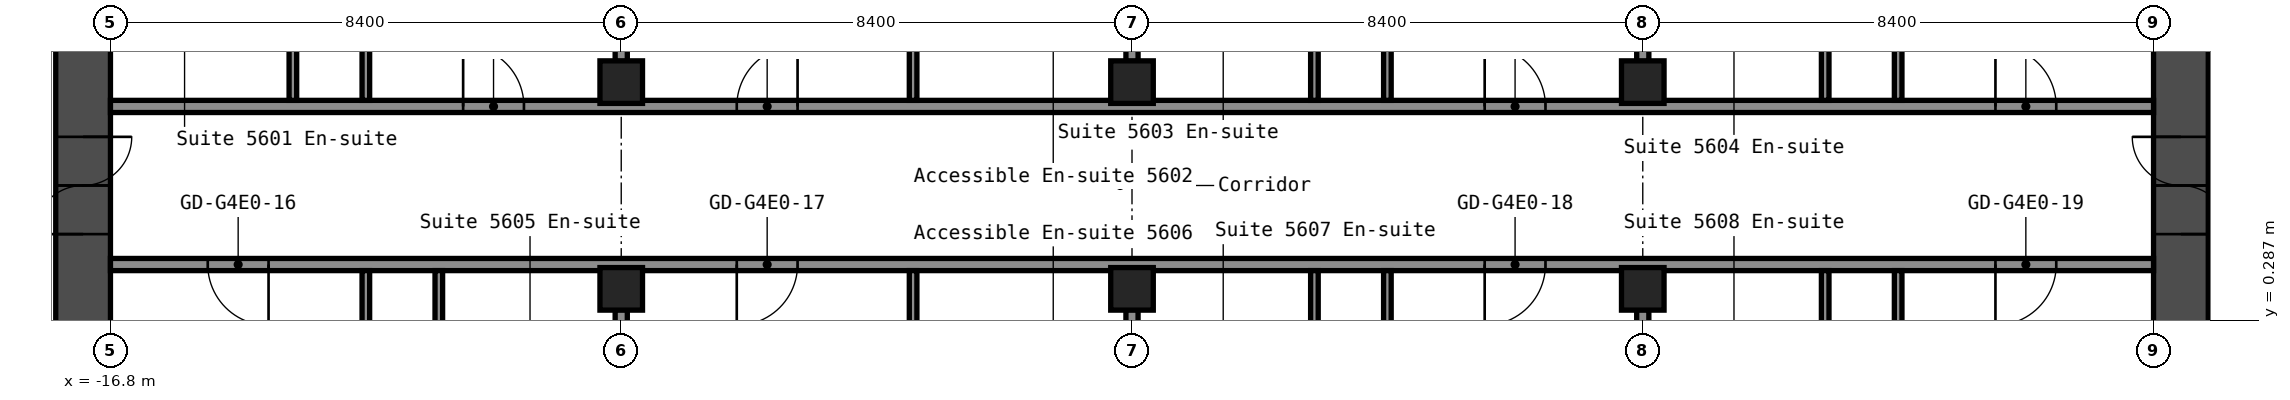
"""IFC4 building model, lengths in metres.
Left out: names, types, materials, properties, quantities, classifications, styles, units other than length and angle.
Written with IfcOpenShell. Run it as: python <this file> out.ifc"""

import sys

from ifc_helpers import new_model, si_unit, direction, frame, frame_2d, origin, origin_2d, place, context, subcontext, project, spatial, rectangle, hollow_rectangle, extrude, element, fill, save


model = new_model("IFC4")
c1 = context("Model", 3, precision=1e-05, world=origin(), true_north=direction((0.0, 1.0)))
c2 = subcontext(c1, "Body", "Model", "MODEL_VIEW")
j1 = project(units=[si_unit("LENGTHUNIT", "METRE"), si_unit("PLANEANGLEUNIT", "RADIAN")], contexts=[c1])
p1 = place(None, origin())
s1 = spatial("IfcSite", under=j1, at=p1, CompositionType="ELEMENT")
p2 = place(p1, origin())
s2 = spatial("IfcBuilding", under=s1, at=p2, CompositionType="ELEMENT")
p3 = place(p2, frame((0.0, 0.0, 199.4)))
s3 = spatial("IfcBuildingStorey", under=s2, at=p3, CompositionType="ELEMENT", Elevation=199.4)
for number, where, z_axis, x_axis in (
    (1, (-8.4, 0.8, 0.0), (0.0, 0.0, 1.0), (1.0, 0.0, 0.0)),
    (2, (-8.4, 4.2, 0.0), (0.0, 0.0, 1.0), (1.0, 0.0, 0.0)),
    (3, (0.0, 0.8, 0.0), (0.0, 0.0, 1.0), (1.0, 0.0, 0.0)),
    (4, (0.0, 4.2, 0.0), (0.0, 0.0, 1.0), (1.0, 0.0, 0.0)),
    (5, (8.4, 0.8, 0.0), (0.0, 0.0, 1.0), (1.0, 0.0, 0.0)),
    (6, (8.4, 4.2, 0.0), (0.0, 0.0, 1.0), (1.0, 0.0, 0.0)),
):
    element("IfcColumn", number, at=place(p3, frame(where, z_axis=z_axis, x_axis=x_axis)), inside=s3, PredefinedType="COLUMN", context=c2, shape_type="SweptSolid", body=[
        extrude(hollow_rectangle(XDim=0.7, YDim=0.7, WallThickness=0.028, at=origin_2d()), origin(), (0.0, 0.0, 1.0), 2.75),
    ])
p4 = place(p3, frame((-17.25, -8.4, 0.0), z_axis=(0.0, 0.0, 1.0), x_axis=(0.0, 1.0, 0.0)))
e7 = element("IfcWall", 7, at=p4, inside=s3, PredefinedType="SHEAR", context=c2, shape_type="SweptSolid", body=[
    extrude(rectangle(XDim=16.8, YDim=0.9, at=frame_2d((8.4, 0.0))), origin(), (0.0, 0.0, 1.0), 2.75),
])
p5 = place(p4, frame((10.1, 0.0, 0.0)))
e8 = element("IfcOpeningElement", 8, at=p5, cuts=e7, PredefinedType="OPENING", context=c2, shape_type="SweptSolid", body=[
    extrude(rectangle(XDim=1.6, YDim=2.1, at=frame_2d((0.8, 1.05))), frame((0.0, 0.46, 0.0), z_axis=(0.0, -1.0, 0.0), x_axis=(1.0, 0.0, 0.0)), (0.0, 0.0, 1.0), 0.92),
])
p6 = place(p3, frame((17.25, -8.4, 0.0), z_axis=(0.0, 0.0, 1.0), x_axis=(0.0, 1.0, 0.0)))
e9 = element("IfcWall", 9, at=p6, inside=s3, PredefinedType="SHEAR", context=c2, shape_type="SweptSolid", body=[
    extrude(rectangle(XDim=16.8, YDim=0.9, at=frame_2d((8.4, 0.0))), origin(), (0.0, 0.0, 1.0), 2.75),
])
p7 = place(p6, frame((10.1, 0.0, 0.0)))
e10 = element("IfcOpeningElement", 10, at=p7, cuts=e9, PredefinedType="OPENING", context=c2, shape_type="SweptSolid", body=[
    extrude(rectangle(XDim=1.6, YDim=2.1, at=frame_2d((0.8, 1.05))), frame((0.0, 0.46, 0.0), z_axis=(0.0, -1.0, 0.0), x_axis=(1.0, 0.0, 0.0)), (0.0, 0.0, 1.0), 0.92),
])
p8 = place(p3, frame((-16.8, 1.2, 0.0), z_axis=(0.0, 0.0, 1.0), x_axis=(1.0, 0.0, 0.0)))
e11 = element("IfcWall", 11, at=p8, inside=s3, PredefinedType="PARTITIONING", context=c2, shape_type="SweptSolid", body=[
    extrude(rectangle(XDim=33.6, YDim=0.2, at=frame_2d((16.8, 0.0))), origin(), (0.0, 0.0, 1.0), 2.75),
])
p9 = place(p8, frame((1.6, 0.0, 0.0)))
e12 = element("IfcOpeningElement", 12, at=p9, cuts=e11, PredefinedType="OPENING", context=c2, shape_type="SweptSolid", body=[
    extrude(rectangle(XDim=1.0, YDim=2.1, at=frame_2d((0.5, 1.05))), frame((0.0, 0.11, 0.0), z_axis=(0.0, -1.0, 0.0), x_axis=(1.0, 0.0, 0.0)), (0.0, 0.0, 1.0), 0.22),
])
p10 = place(p8, frame((10.3, 0.0, 0.0)))
e13 = element("IfcOpeningElement", 13, at=p10, cuts=e11, PredefinedType="OPENING", context=c2, shape_type="SweptSolid", body=[
    extrude(rectangle(XDim=1.0, YDim=2.1, at=frame_2d((0.5, 1.05))), frame((0.0, 0.11, 0.0), z_axis=(0.0, -1.0, 0.0), x_axis=(1.0, 0.0, 0.0)), (0.0, 0.0, 1.0), 0.22),
])
p11 = place(p8, frame((22.6, 0.0, 0.0)))
e14 = element("IfcOpeningElement", 14, at=p11, cuts=e11, PredefinedType="OPENING", context=c2, shape_type="SweptSolid", body=[
    extrude(rectangle(XDim=1.0, YDim=2.1, at=frame_2d((0.5, 1.05))), frame((0.0, 0.11, 0.0), z_axis=(0.0, -1.0, 0.0), x_axis=(1.0, 0.0, 0.0)), (0.0, 0.0, 1.0), 0.22),
])
p12 = place(p8, frame((31.0, 0.0, 0.0)))
e15 = element("IfcOpeningElement", 15, at=p12, cuts=e11, PredefinedType="OPENING", context=c2, shape_type="SweptSolid", body=[
    extrude(rectangle(XDim=1.0, YDim=2.1, at=frame_2d((0.5, 1.05))), frame((0.0, 0.11, 0.0), z_axis=(0.0, -1.0, 0.0), x_axis=(1.0, 0.0, 0.0)), (0.0, 0.0, 1.0), 0.22),
])
p13 = place(p3, frame((-16.8, 3.8, 0.0), z_axis=(0.0, 0.0, 1.0), x_axis=(1.0, 0.0, 0.0)))
e16 = element("IfcWall", 16, at=p13, inside=s3, PredefinedType="PARTITIONING", context=c2, shape_type="SweptSolid", body=[
    extrude(rectangle(XDim=33.6, YDim=0.2, at=frame_2d((16.8, 0.0))), origin(), (0.0, 0.0, 1.0), 2.75),
])
p14 = place(p13, frame((5.8, 0.0, 0.0)))
e17 = element("IfcOpeningElement", 17, at=p14, cuts=e16, PredefinedType="OPENING", context=c2, shape_type="SweptSolid", body=[
    extrude(rectangle(XDim=1.0, YDim=2.1, at=frame_2d((0.5, 1.05))), frame((0.0, 0.11, 0.0), z_axis=(0.0, -1.0, 0.0), x_axis=(1.0, 0.0, 0.0)), (0.0, 0.0, 1.0), 0.22),
])
p15 = place(p13, frame((10.3, 0.0, 0.0)))
e18 = element("IfcOpeningElement", 18, at=p15, cuts=e16, PredefinedType="OPENING", context=c2, shape_type="SweptSolid", body=[
    extrude(rectangle(XDim=1.0, YDim=2.1, at=frame_2d((0.5, 1.05))), frame((0.0, 0.11, 0.0), z_axis=(0.0, -1.0, 0.0), x_axis=(1.0, 0.0, 0.0)), (0.0, 0.0, 1.0), 0.22),
])
p16 = place(p13, frame((22.6, 0.0, 0.0)))
e19 = element("IfcOpeningElement", 19, at=p16, cuts=e16, PredefinedType="OPENING", context=c2, shape_type="SweptSolid", body=[
    extrude(rectangle(XDim=1.0, YDim=2.1, at=frame_2d((0.5, 1.05))), frame((0.0, 0.11, 0.0), z_axis=(0.0, -1.0, 0.0), x_axis=(1.0, 0.0, 0.0)), (0.0, 0.0, 1.0), 0.22),
])
p17 = place(p13, frame((31.0, 0.0, 0.0)))
e20 = element("IfcOpeningElement", 20, at=p17, cuts=e16, PredefinedType="OPENING", context=c2, shape_type="SweptSolid", body=[
    extrude(rectangle(XDim=1.0, YDim=2.1, at=frame_2d((0.5, 1.05))), frame((0.0, 0.11, 0.0), z_axis=(0.0, -1.0, 0.0), x_axis=(1.0, 0.0, 0.0)), (0.0, 0.0, 1.0), 0.22),
])
p18 = place(p3, frame((-13.8, 3.9, 0.0), z_axis=(0.0, 0.0, 1.0), x_axis=(0.0, 1.0, 0.0)))
e21 = element("IfcWall", 21, at=p18, inside=s3, PredefinedType="PARTITIONING", context=c2, shape_type="SweptSolid", body=[
    extrude(rectangle(XDim=3.1, YDim=0.125, at=frame_2d((1.55, 0.0))), origin(), (0.0, 0.0, 1.0), 2.75),
])
p19 = place(p3, frame((-12.6, -15.55, 0.0), z_axis=(0.0, 0.0, 1.0), x_axis=(0.0, 1.0, 0.0)))
e22 = element("IfcWall", 22, at=p19, inside=s3, PredefinedType="PARTITIONING", context=c2, shape_type="SweptSolid", body=[
    extrude(rectangle(XDim=16.65, YDim=0.125, at=frame_2d((8.325, 0.0))), origin(), (0.0, 0.0, 1.0), 2.75),
])
p20 = place(p19, frame((11.7, 0.0, 0.0)))
e23 = element("IfcOpeningElement", 23, at=p20, cuts=e22, PredefinedType="OPENING", context=c2, shape_type="SweptSolid", body=[
    extrude(rectangle(XDim=0.9, YDim=2.1, at=frame_2d((0.45, 1.05))), frame((0.0, 0.073, 0.0), z_axis=(0.0, -1.0, 0.0), x_axis=(1.0, 0.0, 0.0)), (0.0, 0.0, 1.0), 0.145),
])
p21 = place(p3, frame((-12.6, 3.9, 0.0), z_axis=(0.0, 0.0, 1.0), x_axis=(0.0, 1.0, 0.0)))
e24 = element("IfcWall", 24, at=p21, inside=s3, PredefinedType="PARTITIONING", context=c2, shape_type="SweptSolid", body=[
    extrude(rectangle(XDim=16.65, YDim=0.125, at=frame_2d((8.325, 0.0))), origin(), (0.0, 0.0, 1.0), 2.75),
])
p22 = place(p21, frame((4.05, 0.0, 0.0)))
e25 = element("IfcOpeningElement", 25, at=p22, cuts=e24, PredefinedType="OPENING", context=c2, shape_type="SweptSolid", body=[
    extrude(rectangle(XDim=0.9, YDim=2.1, at=frame_2d((0.45, 1.05))), frame((0.0, 0.073, 0.0), z_axis=(0.0, -1.0, 0.0), x_axis=(1.0, 0.0, 0.0)), (0.0, 0.0, 1.0), 0.145),
])
p23 = place(p3, frame((-11.4, -2.0, 0.0), z_axis=(0.0, 0.0, 1.0), x_axis=(0.0, 1.0, 0.0)))
e26 = element("IfcWall", 26, at=p23, inside=s3, PredefinedType="PARTITIONING", context=c2, shape_type="SweptSolid", body=[
    extrude(rectangle(XDim=3.1, YDim=0.125, at=frame_2d((1.55, 0.0))), origin(), (0.0, 0.0, 1.0), 2.75),
])
for number, where, z_axis, x_axis in (
    (27, (-8.4, -15.55, 0.0), (0.0, 0.0, 1.0), (0.0, 1.0, 0.0)),
    (28, (-8.4, 4.54, 0.0), (0.0, 0.0, 1.0), (0.0, 1.0, 0.0)),
):
    element("IfcWall", number, at=place(p3, frame(where, z_axis=z_axis, x_axis=x_axis)), inside=s3, PredefinedType="PARTITIONING", context=c2, shape_type="SweptSolid", body=[
        extrude(rectangle(XDim=16.01, YDim=0.2, at=frame_2d((8.005, 0.0))), origin(), (0.0, 0.0, 1.0), 2.75),
    ])
p24 = place(p3, frame((-3.6, -2.2, 0.0), z_axis=(0.0, 0.0, 1.0), x_axis=(0.0, 1.0, 0.0)))
e29 = element("IfcWall", 29, at=p24, inside=s3, PredefinedType="PARTITIONING", context=c2, shape_type="SweptSolid", body=[
    extrude(rectangle(XDim=3.3, YDim=0.125, at=frame_2d((1.65, 0.0))), origin(), (0.0, 0.0, 1.0), 2.75),
])
p25 = place(p24, frame((1.2, 0.0, 0.0)))
e30 = element("IfcOpeningElement", 30, at=p25, cuts=e29, PredefinedType="OPENING", context=c2, shape_type="SweptSolid", body=[
    extrude(rectangle(XDim=1.0, YDim=2.1, at=frame_2d((0.5, 1.05))), frame((0.0, 0.073, 0.0), z_axis=(0.0, -1.0, 0.0), x_axis=(1.0, 0.0, 0.0)), (0.0, 0.0, 1.0), 0.145),
])
p26 = place(p3, frame((-3.6, 3.9, 0.0), z_axis=(0.0, 0.0, 1.0), x_axis=(0.0, 1.0, 0.0)))
e31 = element("IfcWall", 31, at=p26, inside=s3, PredefinedType="PARTITIONING", context=c2, shape_type="SweptSolid", body=[
    extrude(rectangle(XDim=3.3, YDim=0.125, at=frame_2d((1.65, 0.0))), origin(), (0.0, 0.0, 1.0), 2.75),
])
p27 = place(p26, frame((1.1, 0.0, 0.0)))
e32 = element("IfcOpeningElement", 32, at=p27, cuts=e31, PredefinedType="OPENING", context=c2, shape_type="SweptSolid", body=[
    extrude(rectangle(XDim=1.0, YDim=2.1, at=frame_2d((0.5, 1.05))), frame((0.0, 0.073, 0.0), z_axis=(0.0, -1.0, 0.0), x_axis=(1.0, 0.0, 0.0)), (0.0, 0.0, 1.0), 0.145),
])
for number, where, z_axis, x_axis in (
    (33, (0.0, -15.55, 0.0), (0.0, 0.0, 1.0), (0.0, 1.0, 0.0)),
    (34, (0.0, 4.54, 0.0), (0.0, 0.0, 1.0), (0.0, 1.0, 0.0)),
):
    element("IfcWall", number, at=place(p3, frame(where, z_axis=z_axis, x_axis=x_axis)), inside=s3, PredefinedType="PARTITIONING", context=c2, shape_type="SweptSolid", body=[
        extrude(rectangle(XDim=16.01, YDim=0.2, at=frame_2d((8.005, 0.0))), origin(), (0.0, 0.0, 1.0), 2.75),
    ])
for number, where, z_axis, x_axis in (
    (35, (3.0, -2.0, 0.0), (0.0, 0.0, 1.0), (0.0, 1.0, 0.0)),
    (36, (3.0, 3.9, 0.0), (0.0, 0.0, 1.0), (0.0, 1.0, 0.0)),
):
    element("IfcWall", number, at=place(p3, frame(where, z_axis=z_axis, x_axis=x_axis)), inside=s3, PredefinedType="PARTITIONING", context=c2, shape_type="SweptSolid", body=[
        extrude(rectangle(XDim=3.1, YDim=0.125, at=frame_2d((1.55, 0.0))), origin(), (0.0, 0.0, 1.0), 2.75),
    ])
p28 = place(p3, frame((4.2, -15.55, 0.0), z_axis=(0.0, 0.0, 1.0), x_axis=(0.0, 1.0, 0.0)))
e37 = element("IfcWall", 37, at=p28, inside=s3, PredefinedType="PARTITIONING", context=c2, shape_type="SweptSolid", body=[
    extrude(rectangle(XDim=16.65, YDim=0.125, at=frame_2d((8.325, 0.0))), origin(), (0.0, 0.0, 1.0), 2.75),
])
p29 = place(p28, frame((11.7, 0.0, 0.0)))
e38 = element("IfcOpeningElement", 38, at=p29, cuts=e37, PredefinedType="OPENING", context=c2, shape_type="SweptSolid", body=[
    extrude(rectangle(XDim=0.9, YDim=2.1, at=frame_2d((0.45, 1.05))), frame((0.0, 0.073, 0.0), z_axis=(0.0, -1.0, 0.0), x_axis=(1.0, 0.0, 0.0)), (0.0, 0.0, 1.0), 0.145),
])
p30 = place(p3, frame((4.2, 3.9, 0.0), z_axis=(0.0, 0.0, 1.0), x_axis=(0.0, 1.0, 0.0)))
e39 = element("IfcWall", 39, at=p30, inside=s3, PredefinedType="PARTITIONING", context=c2, shape_type="SweptSolid", body=[
    extrude(rectangle(XDim=16.65, YDim=0.125, at=frame_2d((8.325, 0.0))), origin(), (0.0, 0.0, 1.0), 2.75),
])
p31 = place(p30, frame((4.05, 0.0, 0.0)))
e40 = element("IfcOpeningElement", 40, at=p31, cuts=e39, PredefinedType="OPENING", context=c2, shape_type="SweptSolid", body=[
    extrude(rectangle(XDim=0.9, YDim=2.1, at=frame_2d((0.45, 1.05))), frame((0.0, 0.073, 0.0), z_axis=(0.0, -1.0, 0.0), x_axis=(1.0, 0.0, 0.0)), (0.0, 0.0, 1.0), 0.145),
])
for number, where, z_axis, x_axis in (
    (41, (8.4, -15.55, 0.0), (0.0, 0.0, 1.0), (0.0, 1.0, 0.0)),
    (42, (8.4, 4.54, 0.0), (0.0, 0.0, 1.0), (0.0, 1.0, 0.0)),
):
    element("IfcWall", number, at=place(p3, frame(where, z_axis=z_axis, x_axis=x_axis)), inside=s3, PredefinedType="PARTITIONING", context=c2, shape_type="SweptSolid", body=[
        extrude(rectangle(XDim=16.01, YDim=0.2, at=frame_2d((8.005, 0.0))), origin(), (0.0, 0.0, 1.0), 2.75),
    ])
for number, where, z_axis, x_axis in (
    (43, (11.4, -2.0, 0.0), (0.0, 0.0, 1.0), (0.0, 1.0, 0.0)),
    (44, (11.4, 3.9, 0.0), (0.0, 0.0, 1.0), (0.0, 1.0, 0.0)),
):
    element("IfcWall", number, at=place(p3, frame(where, z_axis=z_axis, x_axis=x_axis)), inside=s3, PredefinedType="PARTITIONING", context=c2, shape_type="SweptSolid", body=[
        extrude(rectangle(XDim=3.1, YDim=0.125, at=frame_2d((1.55, 0.0))), origin(), (0.0, 0.0, 1.0), 2.75),
    ])
p32 = place(p3, frame((12.6, -15.55, 0.0), z_axis=(0.0, 0.0, 1.0), x_axis=(0.0, 1.0, 0.0)))
e45 = element("IfcWall", 45, at=p32, inside=s3, PredefinedType="PARTITIONING", context=c2, shape_type="SweptSolid", body=[
    extrude(rectangle(XDim=16.65, YDim=0.125, at=frame_2d((8.325, 0.0))), origin(), (0.0, 0.0, 1.0), 2.75),
])
p33 = place(p32, frame((11.7, 0.0, 0.0)))
e46 = element("IfcOpeningElement", 46, at=p33, cuts=e45, PredefinedType="OPENING", context=c2, shape_type="SweptSolid", body=[
    extrude(rectangle(XDim=0.9, YDim=2.1, at=frame_2d((0.45, 1.05))), frame((0.0, 0.073, 0.0), z_axis=(0.0, -1.0, 0.0), x_axis=(1.0, 0.0, 0.0)), (0.0, 0.0, 1.0), 0.145),
])
p34 = place(p3, frame((12.6, 3.9, 0.0), z_axis=(0.0, 0.0, 1.0), x_axis=(0.0, 1.0, 0.0)))
e47 = element("IfcWall", 47, at=p34, inside=s3, PredefinedType="PARTITIONING", context=c2, shape_type="SweptSolid", body=[
    extrude(rectangle(XDim=16.65, YDim=0.125, at=frame_2d((8.325, 0.0))), origin(), (0.0, 0.0, 1.0), 2.75),
])
p35 = place(p34, frame((4.05, 0.0, 0.0)))
e48 = element("IfcOpeningElement", 48, at=p35, cuts=e47, PredefinedType="OPENING", context=c2, shape_type="SweptSolid", body=[
    extrude(rectangle(XDim=0.9, YDim=2.1, at=frame_2d((0.45, 1.05))), frame((0.0, 0.073, 0.0), z_axis=(0.0, -1.0, 0.0), x_axis=(1.0, 0.0, 0.0)), (0.0, 0.0, 1.0), 0.145),
])
p36 = place(p5, origin())
e49 = element("IfcDoor", 49, at=p36, inside=s3, OperationType="DOUBLE_DOOR_SINGLE_SWING", PredefinedType="DOOR", context=c2, shape_type="SweptSolid", body=[
    extrude(rectangle(XDim=1.6, YDim=2.1, at=frame_2d((0.8, 1.05))), frame((0.0, 0.025, 0.0), z_axis=(0.0, -1.0, 0.0), x_axis=(1.0, 0.0, 0.0)), (0.0, 0.0, 1.0), 0.05),
])
fill(e8, e49)
p37 = place(p7, origin())
e50 = element("IfcDoor", 50, at=p37, inside=s3, OperationType="DOUBLE_DOOR_SINGLE_SWING", PredefinedType="DOOR", context=c2, shape_type="SweptSolid", body=[
    extrude(rectangle(XDim=1.6, YDim=2.1, at=frame_2d((0.8, 1.05))), frame((0.0, 0.025, 0.0), z_axis=(0.0, -1.0, 0.0), x_axis=(1.0, 0.0, 0.0)), (0.0, 0.0, 1.0), 0.05),
])
fill(e10, e50)
p38 = place(p9, origin())
e51 = element("IfcDoor", 51, at=p38, inside=s3, OperationType="SINGLE_SWING_RIGHT", PredefinedType="DOOR", context=c2, shape_type="SweptSolid", body=[
    extrude(rectangle(XDim=1.0, YDim=2.1, at=frame_2d((0.5, 1.05))), frame((0.0, 0.025, 0.0), z_axis=(0.0, -1.0, 0.0), x_axis=(1.0, 0.0, 0.0)), (0.0, 0.0, 1.0), 0.05),
])
fill(e12, e51)
p39 = place(p10, origin())
e52 = element("IfcDoor", 52, at=p39, inside=s3, OperationType="SINGLE_SWING_LEFT", PredefinedType="DOOR", context=c2, shape_type="SweptSolid", body=[
    extrude(rectangle(XDim=1.0, YDim=2.1, at=frame_2d((0.5, 1.05))), frame((0.0, 0.025, 0.0), z_axis=(0.0, -1.0, 0.0), x_axis=(1.0, 0.0, 0.0)), (0.0, 0.0, 1.0), 0.05),
])
fill(e13, e52)
p40 = place(p11, origin())
e53 = element("IfcDoor", 53, at=p40, inside=s3, OperationType="SINGLE_SWING_LEFT", PredefinedType="DOOR", context=c2, shape_type="SweptSolid", body=[
    extrude(rectangle(XDim=1.0, YDim=2.1, at=frame_2d((0.5, 1.05))), frame((0.0, 0.025, 0.0), z_axis=(0.0, -1.0, 0.0), x_axis=(1.0, 0.0, 0.0)), (0.0, 0.0, 1.0), 0.05),
])
fill(e14, e53)
p41 = place(p12, origin())
e54 = element("IfcDoor", 54, at=p41, inside=s3, OperationType="SINGLE_SWING_LEFT", PredefinedType="DOOR", context=c2, shape_type="SweptSolid", body=[
    extrude(rectangle(XDim=1.0, YDim=2.1, at=frame_2d((0.5, 1.05))), frame((0.0, 0.025, 0.0), z_axis=(0.0, -1.0, 0.0), x_axis=(1.0, 0.0, 0.0)), (0.0, 0.0, 1.0), 0.05),
])
fill(e15, e54)
p42 = place(p14, origin())
e55 = element("IfcDoor", 55, at=p42, inside=s3, OperationType="SINGLE_SWING_RIGHT", PredefinedType="DOOR", context=c2, shape_type="SweptSolid", body=[
    extrude(rectangle(XDim=1.0, YDim=2.1, at=frame_2d((0.5, 1.05))), frame((0.0, 0.025, 0.0), z_axis=(0.0, -1.0, 0.0), x_axis=(1.0, 0.0, 0.0)), (0.0, 0.0, 1.0), 0.05),
])
fill(e17, e55)
p43 = place(p15, origin())
e56 = element("IfcDoor", 56, at=p43, inside=s3, OperationType="SINGLE_SWING_LEFT", PredefinedType="DOOR", context=c2, shape_type="SweptSolid", body=[
    extrude(rectangle(XDim=1.0, YDim=2.1, at=frame_2d((0.5, 1.05))), frame((0.0, 0.025, 0.0), z_axis=(0.0, -1.0, 0.0), x_axis=(1.0, 0.0, 0.0)), (0.0, 0.0, 1.0), 0.05),
])
fill(e18, e56)
p44 = place(p16, origin())
e57 = element("IfcDoor", 57, at=p44, inside=s3, OperationType="SINGLE_SWING_RIGHT", PredefinedType="DOOR", context=c2, shape_type="SweptSolid", body=[
    extrude(rectangle(XDim=1.0, YDim=2.1, at=frame_2d((0.5, 1.05))), frame((0.0, 0.025, 0.0), z_axis=(0.0, -1.0, 0.0), x_axis=(1.0, 0.0, 0.0)), (0.0, 0.0, 1.0), 0.05),
])
fill(e19, e57)
p45 = place(p17, origin())
e58 = element("IfcDoor", 58, at=p45, inside=s3, OperationType="SINGLE_SWING_RIGHT", PredefinedType="DOOR", context=c2, shape_type="SweptSolid", body=[
    extrude(rectangle(XDim=1.0, YDim=2.1, at=frame_2d((0.5, 1.05))), frame((0.0, 0.025, 0.0), z_axis=(0.0, -1.0, 0.0), x_axis=(1.0, 0.0, 0.0)), (0.0, 0.0, 1.0), 0.05),
])
fill(e20, e58)
save(model, sys.argv[1])
